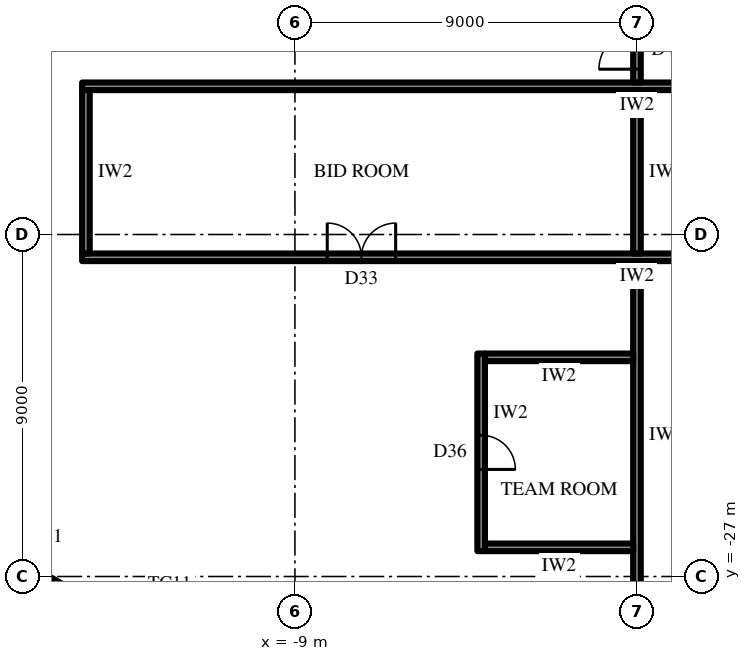
"""IFC4 building model, lengths in metres.
Left out: names, types, materials, properties, quantities, classifications, styles, units other than length and angle.
Written with IfcOpenShell. Run it as: python <this file> out.ifc"""

import sys

from ifc_helpers import new_model, si_unit, direction, frame, frame_2d, origin, place, context, subcontext, project, spatial, rectangle, extrude, element, fill, save


model = new_model("IFC4")
c1 = context("Model", 3, precision=1e-05, world=origin(), true_north=direction((0.0, 1.0)))
c2 = subcontext(c1, "Body", "Model", "MODEL_VIEW")
j1 = project(units=[si_unit("LENGTHUNIT", "METRE"), si_unit("PLANEANGLEUNIT", "RADIAN")], contexts=[c1])
p1 = place(None, origin())
s1 = spatial("IfcSite", under=j1, at=p1, CompositionType="ELEMENT")
p2 = place(p1, origin())
s2 = spatial("IfcBuilding", under=s1, at=p2, CompositionType="ELEMENT")
p3 = place(p2, frame((0.0, 0.0, 265.9)))
s3 = spatial("IfcBuildingStorey", under=s2, at=p3, CompositionType="ELEMENT", Elevation=265.9)
p4 = place(p3, frame((-18.707, -25.299, 0.0), z_axis=(0.0, 0.0, 1.0), x_axis=(0.866010973379, -0.500024993363, 0.0)))
e1 = element("IfcWall", 1, at=p4, inside=s3, PredefinedType="SOLIDWALL", context=c2, shape_type="SweptSolid", body=[
    extrude(rectangle(XDim=7.102, YDim=0.3, at=frame_2d((3.551, 0.0))), origin(), (0.0, 0.0, 1.0), 2.8),
])
p5 = place(p3, frame((14.6, -14.1, 0.0), z_axis=(0.0, 0.0, 1.0), x_axis=(-1.0, 0.0, 0.0)))
e2 = element("IfcWall", 2, at=p5, inside=s3, PredefinedType="PARTITIONING", context=c2, shape_type="SweptSolid", body=[
    extrude(rectangle(XDim=29.2, YDim=0.2, at=frame_2d((14.6, 0.0))), origin(), (0.0, 0.0, 1.0), 4.0),
])
p6 = place(p3, frame((14.6, -18.6, 0.0), z_axis=(0.0, 0.0, 1.0), x_axis=(-1.0, 0.0, 0.0)))
e3 = element("IfcWall", 3, at=p6, inside=s3, PredefinedType="PARTITIONING", context=c2, shape_type="SweptSolid", body=[
    extrude(rectangle(XDim=29.2, YDim=0.2, at=frame_2d((14.6, 0.0))), origin(), (0.0, 0.0, 1.0), 4.0),
])
p7 = place(p6, frame((6.45, 0.0, 0.0)))
e4 = element("IfcOpeningElement", 4, at=p7, cuts=e3, PredefinedType="OPENING", context=c2, shape_type="SweptSolid", body=[
    extrude(rectangle(XDim=1.8, YDim=2.4, at=frame_2d((0.9, 1.2))), frame((0.0, 0.11, 0.0), z_axis=(0.0, -1.0, 0.0), x_axis=(1.0, 0.0, 0.0)), (0.0, 0.0, 1.0), 0.22),
])
p8 = place(p6, frame((20.95, 0.0, 0.0)))
e5 = element("IfcOpeningElement", 5, at=p8, cuts=e3, PredefinedType="OPENING", context=c2, shape_type="SweptSolid", body=[
    extrude(rectangle(XDim=1.8, YDim=2.4, at=frame_2d((0.9, 1.2))), frame((0.0, 0.11, 0.0), z_axis=(0.0, -1.0, 0.0), x_axis=(1.0, 0.0, 0.0)), (0.0, 0.0, 1.0), 0.22),
])
p9 = place(p3, frame((0.0, -14.2, 0.0), z_axis=(0.0, 0.0, 1.0), x_axis=(0.0, -1.0, 0.0)))
e6 = element("IfcWall", 6, at=p9, inside=s3, PredefinedType="PARTITIONING", context=c2, shape_type="SweptSolid", body=[
    extrude(rectangle(XDim=4.3, YDim=0.2, at=frame_2d((2.15, 0.0))), origin(), (0.0, 0.0, 1.0), 2.992),
])
p10 = place(p3, frame((-14.5, -14.2, 0.0), z_axis=(0.0, 0.0, 1.0), x_axis=(0.0, -1.0, 0.0)))
e7 = element("IfcWall", 7, at=p10, inside=s3, PredefinedType="PARTITIONING", context=c2, shape_type="SweptSolid", body=[
    extrude(rectangle(XDim=4.3, YDim=0.2, at=frame_2d((2.15, 0.0))), origin(), (0.0, 0.0, 1.0), 4.0),
])
p11 = place(p3, frame((0.0, -12.3, 0.0), z_axis=(0.0, 0.0, 1.0), x_axis=(0.0, -1.0, 0.0)))
e8 = element("IfcWall", 8, at=p11, inside=s3, PredefinedType="PARTITIONING", context=c2, shape_type="SweptSolid", body=[
    extrude(rectangle(XDim=1.7, YDim=0.2, at=frame_2d((0.85, 0.0))), origin(), (0.0, 0.0, 1.0), 2.992),
])
p12 = place(p11, frame((0.35, 0.0, 0.0)))
e9 = element("IfcOpeningElement", 9, at=p12, cuts=e8, PredefinedType="OPENING", context=c2, shape_type="SweptSolid", body=[
    extrude(rectangle(XDim=1.0, YDim=2.2, at=frame_2d((0.5, 1.1))), frame((0.0, 0.11, 0.0), z_axis=(0.0, -1.0, 0.0), x_axis=(1.0, 0.0, 0.0)), (0.0, 0.0, 1.0), 0.22),
])
p13 = place(p3, frame((0.0, -18.7, 0.0), z_axis=(0.0, 0.0, 1.0), x_axis=(0.0, -1.0, 0.0)))
e10 = element("IfcWall", 10, at=p13, inside=s3, PredefinedType="PARTITIONING", context=c2, shape_type="SweptSolid", body=[
    extrude(rectangle(XDim=9.15, YDim=0.2, at=frame_2d((4.575, 0.0))), origin(), (0.0, 0.0, 1.0), 2.992),
])
p14 = place(p3, frame((-4.1, -21.133, 0.0), z_axis=(0.0, 0.0, 1.0), x_axis=(0.0, -1.0, 0.0)))
e11 = element("IfcWall", 11, at=p14, inside=s3, PredefinedType="PARTITIONING", context=c2, shape_type="SweptSolid", body=[
    extrude(rectangle(XDim=5.2, YDim=0.2, at=frame_2d((2.6, 0.0))), origin(), (0.0, 0.0, 1.0), 4.0),
])
p15 = place(p14, frame((2.15, 0.0, 0.0)))
e12 = element("IfcOpeningElement", 12, at=p15, cuts=e11, PredefinedType="OPENING", context=c2, shape_type="SweptSolid", body=[
    extrude(rectangle(XDim=0.9, YDim=2.2, at=frame_2d((0.45, 1.1))), frame((0.0, 0.11, 0.0), z_axis=(0.0, -1.0, 0.0), x_axis=(1.0, 0.0, 0.0)), (0.0, 0.0, 1.0), 0.22),
])
for number, where, z_axis, x_axis in (
    (13, (-0.1, -21.232, 0.0), (0.0, 0.0, 1.0), (-1.0, 0.0, 0.0)),
    (14, (-0.1, -26.232, 0.0), (0.0, 0.0, 1.0), (-1.0, 0.0, 0.0)),
):
    element("IfcWall", number, at=place(p3, frame(where, z_axis=z_axis, x_axis=x_axis)), inside=s3, PredefinedType="PARTITIONING", context=c2, shape_type="SweptSolid", body=[
        extrude(rectangle(XDim=3.9, YDim=0.2, at=frame_2d((1.95, 0.0))), origin(), (0.0, 0.0, 1.0), 4.0),
    ])
p16 = place(p8, frame((1.8, 0.0, 0.0), z_axis=(0.0, 0.0, 1.0), x_axis=(-1.0, 0.0, 0.0)))
e15 = element("IfcDoor", 15, at=p16, inside=s3, OperationType="DOUBLE_DOOR_SINGLE_SWING", PredefinedType="DOOR", context=c2, shape_type="SweptSolid", body=[
    extrude(rectangle(XDim=1.8, YDim=2.4, at=frame_2d((0.9, 1.2))), frame((0.0, 0.025, 0.0), z_axis=(0.0, -1.0, 0.0), x_axis=(1.0, 0.0, 0.0)), (0.0, 0.0, 1.0), 0.05),
])
fill(e5, e15)
p17 = place(p12, frame((1.0, 0.0, 0.0), z_axis=(0.0, 0.0, 1.0), x_axis=(-1.0, 0.0, 0.0)))
e16 = element("IfcDoor", 16, at=p17, inside=s3, OperationType="SINGLE_SWING_RIGHT", PredefinedType="DOOR", context=c2, shape_type="SweptSolid", body=[
    extrude(rectangle(XDim=1.0, YDim=2.2, at=frame_2d((0.5, 1.1))), frame((0.0, 0.025, 0.0), z_axis=(0.0, -1.0, 0.0), x_axis=(1.0, 0.0, 0.0)), (0.0, 0.0, 1.0), 0.05),
])
fill(e9, e16)
p18 = place(p15, origin())
e17 = element("IfcDoor", 17, at=p18, inside=s3, OperationType="SINGLE_SWING_LEFT", PredefinedType="DOOR", context=c2, shape_type="SweptSolid", body=[
    extrude(rectangle(XDim=0.9, YDim=2.2, at=frame_2d((0.45, 1.1))), frame((0.0, 0.025, 0.0), z_axis=(0.0, -1.0, 0.0), x_axis=(1.0, 0.0, 0.0)), (0.0, 0.0, 1.0), 0.05),
])
fill(e12, e17)
save(model, sys.argv[1])
